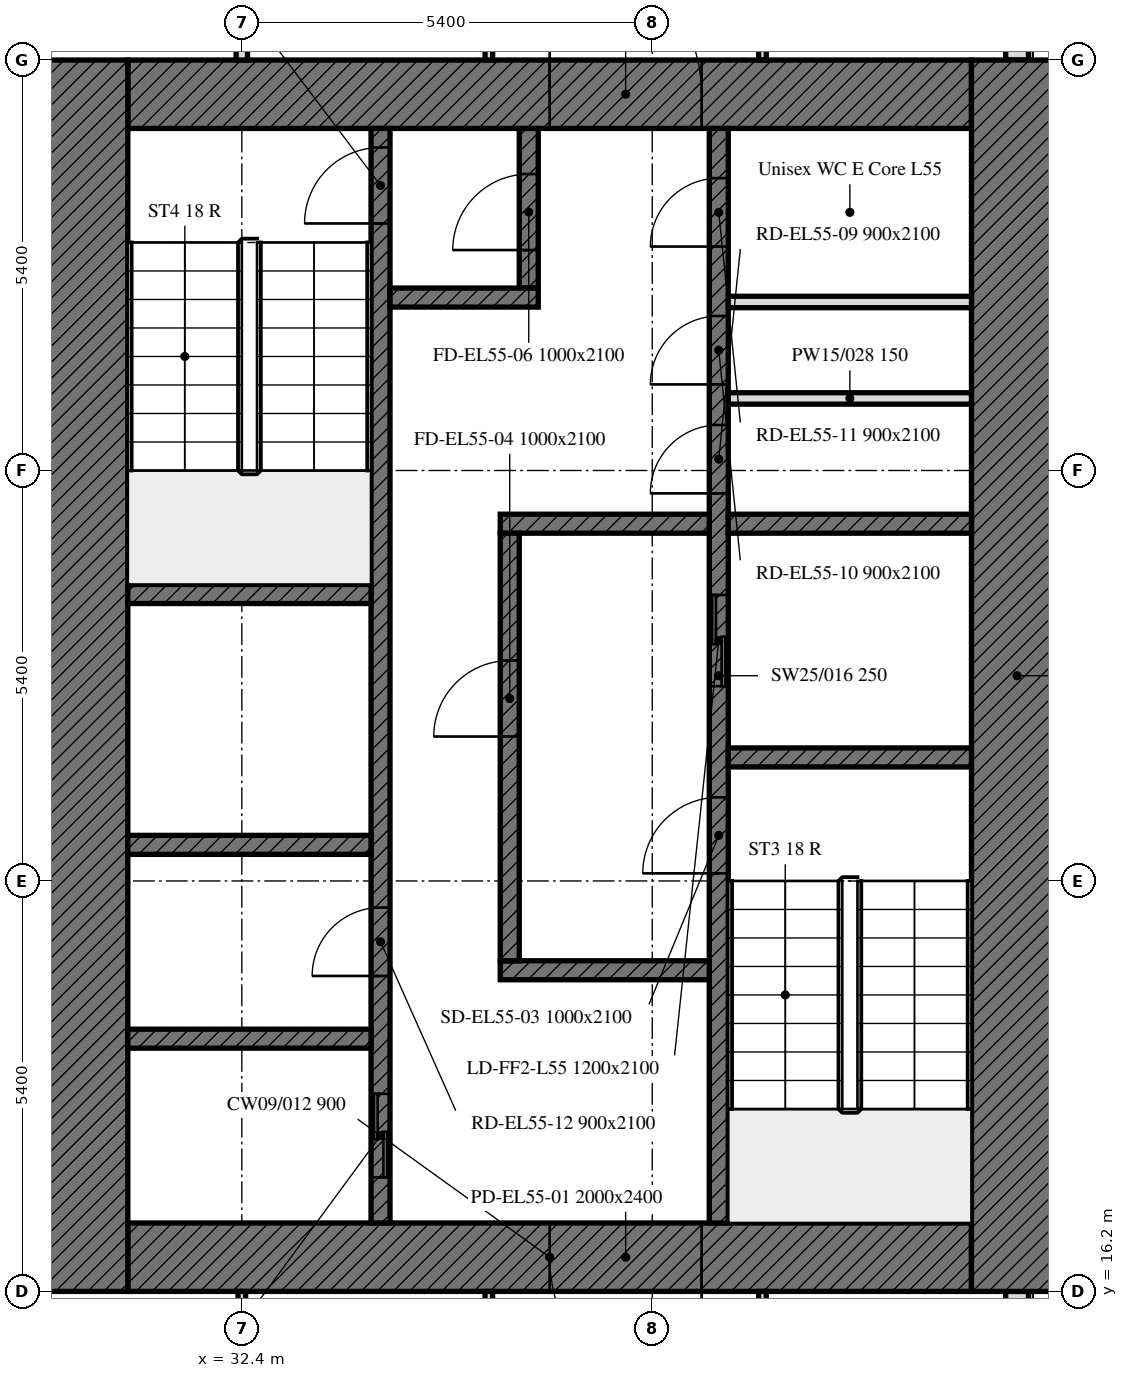
"""IFC4 building model, lengths in metres.
Left out: names, types, materials, properties, quantities, classifications, styles, units other than length and angle.
Written with IfcOpenShell. Run it as: python <this file> out.ifc"""

import sys

from ifc_helpers import new_model, si_unit, direction, frame, frame_2d, origin, place, context, subcontext, project, spatial, rectangle, extrude, element, fill, save


model = new_model("IFC4")
c1 = context("Model", 3, precision=1e-05, world=origin(), true_north=direction((0.0, 1.0)))
c2 = subcontext(c1, "Body", "Model", "MODEL_VIEW")
j1 = project(units=[si_unit("LENGTHUNIT", "METRE"), si_unit("PLANEANGLEUNIT", "RADIAN")], contexts=[c1])
p1 = place(None, origin())
s1 = spatial("IfcSite", under=j1, at=p1, CompositionType="ELEMENT")
p2 = place(p1, origin())
s2 = spatial("IfcBuilding", under=s1, at=p2, CompositionType="ELEMENT")
p3 = place(p2, frame((0.0, 0.0, 220.3)))
s3 = spatial("IfcBuildingStorey", under=s2, at=p3, CompositionType="ELEMENT", Elevation=220.3)
p4 = place(p3, frame((42.6, 10.986, 0.0), z_axis=(0.0, 0.0, 1.0), x_axis=(0.0, 1.0, 0.0)))
e1 = element("IfcWall", 1, at=p4, inside=s3, PredefinedType="SOLIDWALL", context=c2, shape_type="SweptSolid", body=[
    extrude(rectangle(XDim=5.214, YDim=0.3, at=frame_2d((2.607, 0.0))), origin(), (0.0, 0.0, 1.0), 3.0),
])
p5 = place(p4, frame((1.239, 0.0, 0.9)))
e2 = element("IfcOpeningElement", 2, at=p5, cuts=e1, PredefinedType="OPENING", context=c2, shape_type="SweptSolid", body=[
    extrude(rectangle(XDim=0.65, YDim=1.7, at=frame_2d((0.325, 0.85))), frame((0.0, 0.16, 0.0), z_axis=(0.0, -1.0, 0.0), x_axis=(1.0, 0.0, 0.0)), (0.0, 0.0, 1.0), 0.32),
])
p6 = place(p4, frame((2.764, 0.0, 0.9)))
e3 = element("IfcOpeningElement", 3, at=p6, cuts=e1, PredefinedType="OPENING", context=c2, shape_type="SweptSolid", body=[
    extrude(rectangle(XDim=1.1, YDim=1.7, at=frame_2d((0.55, 0.85))), frame((0.0, 0.16, 0.0), z_axis=(0.0, -1.0, 0.0), x_axis=(1.0, 0.0, 0.0)), (0.0, 0.0, 1.0), 0.32),
])
p7 = place(p3, frame((42.6, 32.4, 0.0), z_axis=(0.0, 0.0, 1.0), x_axis=(0.0, 1.0, 0.0)))
e4 = element("IfcWall", 4, at=p7, inside=s3, PredefinedType="SOLIDWALL", context=c2, shape_type="SweptSolid", body=[
    extrude(rectangle(XDim=10.614, YDim=0.3, at=frame_2d((5.307, 0.0))), origin(), (0.0, 0.0, 1.0), 3.0),
])
p8 = place(p7, frame((1.0, 0.0, 0.9)))
e5 = element("IfcOpeningElement", 5, at=p8, cuts=e4, PredefinedType="OPENING", context=c2, shape_type="SweptSolid", body=[
    extrude(rectangle(XDim=3.4, YDim=1.7, at=frame_2d((1.7, 0.85))), frame((0.0, 0.16, 0.0), z_axis=(0.0, -1.0, 0.0), x_axis=(1.0, 0.0, 0.0)), (0.0, 0.0, 1.0), 0.32),
])
p9 = place(p7, frame((7.375, 0.0, 0.9)))
e6 = element("IfcOpeningElement", 6, at=p9, cuts=e4, PredefinedType="OPENING", context=c2, shape_type="SweptSolid", body=[
    extrude(rectangle(XDim=0.65, YDim=1.7, at=frame_2d((0.325, 0.85))), frame((0.0, 0.16, 0.0), z_axis=(0.0, -1.0, 0.0), x_axis=(1.0, 0.0, 0.0)), (0.0, 0.0, 1.0), 0.32),
])
p10 = place(p7, frame((8.175, 0.0, 0.9)))
e7 = element("IfcOpeningElement", 7, at=p10, cuts=e4, PredefinedType="OPENING", context=c2, shape_type="SweptSolid", body=[
    extrude(rectangle(XDim=0.65, YDim=1.7, at=frame_2d((0.325, 0.85))), frame((0.0, 0.16, 0.0), z_axis=(0.0, -1.0, 0.0), x_axis=(1.0, 0.0, 0.0)), (0.0, 0.0, 1.0), 0.32),
])
p11 = place(p3, frame((42.0, 16.65, 0.0), z_axis=(0.0, 0.0, 1.0), x_axis=(-1.0, 0.0, 0.0)))
e8 = element("IfcWall", 8, at=p11, inside=s3, PredefinedType="SOLIDWALL", context=c2, shape_type="SweptSolid", body=[
    extrude(rectangle(XDim=11.1, YDim=0.9, at=frame_2d((5.55, 0.0))), origin(), (0.0, 0.0, 1.0), 3.0),
])
p12 = place(p11, frame((3.55, 0.0, 0.0)))
e9 = element("IfcOpeningElement", 9, at=p12, cuts=e8, PredefinedType="OPENING", context=c2, shape_type="SweptSolid", body=[
    extrude(rectangle(XDim=2.0, YDim=2.4, at=frame_2d((1.0, 1.2))), frame((0.0, 0.45, 0.0), z_axis=(0.0, -1.0, 0.0), x_axis=(1.0, 0.0, 0.0)), (0.0, 0.0, 1.0), 0.9),
])
p13 = place(p3, frame((30.9, 31.95, 0.0), z_axis=(0.0, 0.0, 1.0), x_axis=(1.0, 0.0, 0.0)))
e10 = element("IfcWall", 10, at=p13, inside=s3, PredefinedType="SOLIDWALL", context=c2, shape_type="SweptSolid", body=[
    extrude(rectangle(XDim=11.1, YDim=0.9, at=frame_2d((5.55, 0.0))), origin(), (0.0, 0.0, 1.0), 3.0),
])
p14 = place(p13, frame((5.55, 0.0, 0.0)))
e11 = element("IfcOpeningElement", 11, at=p14, cuts=e10, PredefinedType="OPENING", context=c2, shape_type="SweptSolid", body=[
    extrude(rectangle(XDim=2.0, YDim=2.4, at=frame_2d((1.0, 1.2))), frame((0.0, 0.45, 0.0), z_axis=(0.0, -1.0, 0.0), x_axis=(1.0, 0.0, 0.0)), (0.0, 0.0, 1.0), 0.9),
])
for number, where, z_axis, x_axis in (
    (12, (42.6, 32.4, 0.0), (0.0, 0.0, 1.0), (0.0, -1.0, 0.0)),
    (13, (30.3, 16.2, 0.0), (0.0, 0.0, 1.0), (0.0, 1.0, 0.0)),
):
    element("IfcWall", number, at=place(p3, frame(where, z_axis=z_axis, x_axis=x_axis)), inside=s3, PredefinedType="SOLIDWALL", context=c2, shape_type="SweptSolid", body=[
        extrude(rectangle(XDim=16.2, YDim=1.2, at=frame_2d((8.1, 0.0))), origin(), (0.0, 0.0, 1.0), 3.0),
    ])
p15 = place(p3, frame((38.675, 17.1, 0.0), z_axis=(0.0, 0.0, 1.0), x_axis=(0.0, 1.0, 0.0)))
e14 = element("IfcWall", 14, at=p15, inside=s3, PredefinedType="SOLIDWALL", context=c2, shape_type="SweptSolid", body=[
    extrude(rectangle(XDim=14.4, YDim=0.25, at=frame_2d((7.2, 0.0))), origin(), (0.0, 0.0, 1.0), 3.0),
])
p16 = place(p15, frame((4.6, 0.0, 0.0)))
e15 = element("IfcOpeningElement", 15, at=p16, cuts=e14, PredefinedType="OPENING", context=c2, shape_type="SweptSolid", body=[
    extrude(rectangle(XDim=1.0, YDim=2.1, at=frame_2d((0.5, 1.05))), frame((0.0, 0.125, 0.0), z_axis=(0.0, -1.0, 0.0), x_axis=(1.0, 0.0, 0.0)), (0.0, 0.0, 1.0), 0.25),
])
p17 = place(p15, frame((7.062, 0.0, 0.0)))
e16 = element("IfcOpeningElement", 16, at=p17, cuts=e14, PredefinedType="OPENING", context=c2, shape_type="SweptSolid", body=[
    extrude(rectangle(XDim=1.2, YDim=2.1, at=frame_2d((0.6, 1.05))), frame((0.0, 0.125, 0.0), z_axis=(0.0, -1.0, 0.0), x_axis=(1.0, 0.0, 0.0)), (0.0, 0.0, 1.0), 0.25),
])
p18 = place(p15, frame((9.599, 0.0, 0.0)))
e17 = element("IfcOpeningElement", 17, at=p18, cuts=e14, PredefinedType="OPENING", context=c2, shape_type="SweptSolid", body=[
    extrude(rectangle(XDim=0.9, YDim=2.1, at=frame_2d((0.45, 1.05))), frame((0.0, 0.125, 0.0), z_axis=(0.0, -1.0, 0.0), x_axis=(1.0, 0.0, 0.0)), (0.0, 0.0, 1.0), 0.25),
])
p19 = place(p15, frame((11.032, 0.0, 0.0)))
e18 = element("IfcOpeningElement", 18, at=p19, cuts=e14, PredefinedType="OPENING", context=c2, shape_type="SweptSolid", body=[
    extrude(rectangle(XDim=0.9, YDim=2.1, at=frame_2d((0.45, 1.05))), frame((0.0, 0.125, 0.0), z_axis=(0.0, -1.0, 0.0), x_axis=(1.0, 0.0, 0.0)), (0.0, 0.0, 1.0), 0.25),
])
p20 = place(p15, frame((12.846, 0.0, 0.0)))
e19 = element("IfcOpeningElement", 19, at=p20, cuts=e14, PredefinedType="OPENING", context=c2, shape_type="SweptSolid", body=[
    extrude(rectangle(XDim=0.9, YDim=2.1, at=frame_2d((0.45, 1.05))), frame((0.0, 0.125, 0.0), z_axis=(0.0, -1.0, 0.0), x_axis=(1.0, 0.0, 0.0)), (0.0, 0.0, 1.0), 0.25),
])
p21 = place(p3, frame((34.225, 17.1, 0.0), z_axis=(0.0, 0.0, 1.0), x_axis=(0.0, 1.0, 0.0)))
e20 = element("IfcWall", 20, at=p21, inside=s3, PredefinedType="SOLIDWALL", context=c2, shape_type="SweptSolid", body=[
    extrude(rectangle(XDim=14.4, YDim=0.25, at=frame_2d((7.2, 0.0))), origin(), (0.0, 0.0, 1.0), 3.0),
])
p22 = place(p21, frame((13.15, 0.0, 0.0)))
e21 = element("IfcOpeningElement", 21, at=p22, cuts=e20, PredefinedType="OPENING", context=c2, shape_type="SweptSolid", body=[
    extrude(rectangle(XDim=1.0, YDim=2.1, at=frame_2d((0.5, 1.05))), frame((0.0, 0.125, 0.0), z_axis=(0.0, -1.0, 0.0), x_axis=(1.0, 0.0, 0.0)), (0.0, 0.0, 1.0), 0.25),
])
p23 = place(p21, frame((0.6, 0.0, 0.0)))
e22 = element("IfcOpeningElement", 22, at=p23, cuts=e20, PredefinedType="OPENING", context=c2, shape_type="SweptSolid", body=[
    extrude(rectangle(XDim=1.1, YDim=2.1, at=frame_2d((0.55, 1.05))), frame((0.0, 0.125, 0.0), z_axis=(0.0, -1.0, 0.0), x_axis=(1.0, 0.0, 0.0)), (0.0, 0.0, 1.0), 0.25),
])
p24 = place(p21, frame((3.25, 0.0, 0.0)))
e23 = element("IfcOpeningElement", 23, at=p24, cuts=e20, PredefinedType="OPENING", context=c2, shape_type="SweptSolid", body=[
    extrude(rectangle(XDim=0.9, YDim=2.1, at=frame_2d((0.45, 1.05))), frame((0.0, 0.125, 0.0), z_axis=(0.0, -1.0, 0.0), x_axis=(1.0, 0.0, 0.0)), (0.0, 0.0, 1.0), 0.25),
])
p25 = place(p3, frame((38.8, 23.225, 0.0), z_axis=(0.0, 0.0, 1.0), x_axis=(1.0, 0.0, 0.0)))
e24 = element("IfcWall", 24, at=p25, inside=s3, PredefinedType="SOLIDWALL", context=c2, shape_type="SweptSolid", body=[
    extrude(rectangle(XDim=3.2, YDim=0.25, at=frame_2d((1.6, 0.0))), origin(), (0.0, 0.0, 1.0), 3.0),
])
for number, where, z_axis, x_axis in (
    (25, (30.9, 25.375, 0.0), (0.0, 0.0, 1.0), (1.0, 0.0, 0.0)),
    (26, (30.9, 22.075, 0.0), (0.0, 0.0, 1.0), (1.0, 0.0, 0.0)),
):
    element("IfcWall", number, at=place(p3, frame(where, z_axis=z_axis, x_axis=x_axis)), inside=s3, PredefinedType="SOLIDWALL", context=c2, shape_type="SweptSolid", body=[
        extrude(rectangle(XDim=3.2, YDim=0.25, at=frame_2d((1.6, 0.0))), origin(), (0.0, 0.0, 1.0), 3.0),
    ])
p26 = place(p3, frame((38.8, 26.3, 0.0), z_axis=(0.0, 0.0, 1.0), x_axis=(1.0, 0.0, 0.0)))
e27 = element("IfcWall", 27, at=p26, inside=s3, PredefinedType="SOLIDWALL", context=c2, shape_type="SweptSolid", body=[
    extrude(rectangle(XDim=3.2, YDim=0.25, at=frame_2d((1.6, 0.0))), origin(), (0.0, 0.0, 1.0), 3.0),
])
for number, where, z_axis, x_axis in (
    (28, (35.8, 26.3, 0.0), (0.0, 0.0, 1.0), (1.0, 0.0, 0.0)),
    (29, (35.8, 20.425, 0.0), (0.0, 0.0, 1.0), (1.0, 0.0, 0.0)),
):
    element("IfcWall", number, at=place(p3, frame(where, z_axis=z_axis, x_axis=x_axis)), inside=s3, PredefinedType="SOLIDWALL", context=c2, shape_type="SweptSolid", body=[
        extrude(rectangle(XDim=2.75, YDim=0.25, at=frame_2d((1.375, 0.0))), origin(), (0.0, 0.0, 1.0), 3.0),
    ])
p27 = place(p3, frame((36.175, 29.4, 0.0), z_axis=(0.0, 0.0, 1.0), x_axis=(0.0, 1.0, 0.0)))
e30 = element("IfcWall", 30, at=p27, inside=s3, PredefinedType="SOLIDWALL", context=c2, shape_type="SweptSolid", body=[
    extrude(rectangle(XDim=2.1, YDim=0.25, at=frame_2d((1.05, 0.0))), origin(), (0.0, 0.0, 1.0), 3.0),
])
p28 = place(p27, frame((0.5, 0.0, 0.0)))
e31 = element("IfcOpeningElement", 31, at=p28, cuts=e30, PredefinedType="OPENING", context=c2, shape_type="SweptSolid", body=[
    extrude(rectangle(XDim=1.0, YDim=2.1, at=frame_2d((0.5, 1.05))), frame((0.0, 0.125, 0.0), z_axis=(0.0, -1.0, 0.0), x_axis=(1.0, 0.0, 0.0)), (0.0, 0.0, 1.0), 0.25),
])
p29 = place(p3, frame((34.35, 29.275, 0.0), z_axis=(0.0, 0.0, 1.0), x_axis=(1.0, 0.0, 0.0)))
e32 = element("IfcWall", 32, at=p29, inside=s3, PredefinedType="SOLIDWALL", context=c2, shape_type="SweptSolid", body=[
    extrude(rectangle(XDim=1.95, YDim=0.25, at=frame_2d((0.975, 0.0))), origin(), (0.0, 0.0, 1.0), 3.0),
])
p30 = place(p3, frame((35.925, 20.55, 0.0), z_axis=(0.0, 0.0, 1.0), x_axis=(0.0, 1.0, 0.0)))
e33 = element("IfcWall", 33, at=p30, inside=s3, PredefinedType="SOLIDWALL", context=c2, shape_type="SweptSolid", body=[
    extrude(rectangle(XDim=5.625, YDim=0.25, at=frame_2d((2.812, 0.0))), origin(), (0.0, 0.0, 1.0), 3.0),
])
p31 = place(p30, frame((2.95, 0.0, 0.0)))
e34 = element("IfcOpeningElement", 34, at=p31, cuts=e33, PredefinedType="OPENING", context=c2, shape_type="SweptSolid", body=[
    extrude(rectangle(XDim=1.0, YDim=2.1, at=frame_2d((0.5, 1.05))), frame((0.0, 0.125, 0.0), z_axis=(0.0, -1.0, 0.0), x_axis=(1.0, 0.0, 0.0)), (0.0, 0.0, 1.0), 0.25),
])
p32 = place(p3, frame((30.9, 19.525, 0.0), z_axis=(0.0, 0.0, 1.0), x_axis=(1.0, 0.0, 0.0)))
e35 = element("IfcWall", 35, at=p32, inside=s3, PredefinedType="SOLIDWALL", context=c2, shape_type="SweptSolid", body=[
    extrude(rectangle(XDim=3.2, YDim=0.25, at=frame_2d((1.6, 0.0))), origin(), (0.0, 0.0, 1.0), 3.0),
])
for number, where, z_axis, x_axis in (
    (36, (38.8, 27.948, 0.0), (0.0, 0.0, 1.0), (1.0, 0.0, 0.0)),
    (37, (38.8, 29.217, 0.0), (0.0, 0.0, 1.0), (1.0, 0.0, 0.0)),
):
    element("IfcWall", number, at=place(p3, frame(where, z_axis=z_axis, x_axis=x_axis)), inside=s3, PredefinedType="PARTITIONING", context=c2, shape_type="SweptSolid", body=[
        extrude(rectangle(XDim=3.2, YDim=0.15, at=frame_2d((1.6, 0.0))), origin(), (0.0, 0.0, 1.0), 3.0),
    ])
p33 = place(p3, frame((32.4, 32.4, 0.0), z_axis=(0.0, 0.0, 1.0), x_axis=(0.0, 1.0, 0.0)))
e38 = element("IfcWall", 38, at=p33, inside=s3, PredefinedType="PARTITIONING", context=c2, shape_type="SweptSolid", body=[
    extrude(rectangle(XDim=5.005, YDim=0.15, at=frame_2d((2.502, 0.0))), origin(), (0.0, 0.0, 1.0), 2.4),
])
for number, where, z_axis, x_axis in (
    (39, (39.25, 32.4, 0.0), (0.0, 0.0, 1.0), (0.0, 1.0, 0.0)),
    (40, (35.65, 39.525, 0.0), (0.0, 0.0, 1.0), (0.0, -1.0, 0.0)),
):
    element("IfcWall", number, at=place(p3, frame(where, z_axis=z_axis, x_axis=x_axis)), inside=s3, PredefinedType="PARTITIONING", context=c2, shape_type="SweptSolid", body=[
        extrude(rectangle(XDim=7.125, YDim=0.1, at=frame_2d((3.562, 0.0))), origin(), (0.0, 0.0, 1.0), 3.0),
    ])
for number, where, z_axis, x_axis in (
    (41, (32.4, 13.125, 0.0), (0.0, 0.0, 1.0), (0.0, 1.0, 0.0)),
    (42, (39.25, 13.125, 0.0), (0.0, 0.0, 1.0), (0.0, 1.0, 0.0)),
    (43, (35.65, 16.2, 0.0), (0.0, 0.0, 1.0), (0.0, -1.0, 0.0)),
):
    element("IfcWall", number, at=place(p3, frame(where, z_axis=z_axis, x_axis=x_axis)), inside=s3, PredefinedType="PARTITIONING", context=c2, shape_type="SweptSolid", body=[
        extrude(rectangle(XDim=3.075, YDim=0.1, at=frame_2d((1.538, 0.0))), origin(), (0.0, 0.0, 1.0), 3.0),
    ])
p34 = place(p12, origin())
e44 = element("IfcDoor", 44, at=p34, inside=s3, OperationType="DOUBLE_DOOR_SINGLE_SWING", PredefinedType="DOOR", context=c2, shape_type="SweptSolid", body=[
    extrude(rectangle(XDim=2.0, YDim=2.4, at=frame_2d((1.0, 1.2))), frame((0.0, 0.025, 0.0), z_axis=(0.0, -1.0, 0.0), x_axis=(1.0, 0.0, 0.0)), (0.0, 0.0, 1.0), 0.05),
])
fill(e9, e44)
p35 = place(p14, origin())
e45 = element("IfcDoor", 45, at=p35, inside=s3, OperationType="DOUBLE_DOOR_SINGLE_SWING", PredefinedType="DOOR", context=c2, shape_type="SweptSolid", body=[
    extrude(rectangle(XDim=2.0, YDim=2.4, at=frame_2d((1.0, 1.2))), frame((0.0, 0.025, 0.0), z_axis=(0.0, -1.0, 0.0), x_axis=(1.0, 0.0, 0.0)), (0.0, 0.0, 1.0), 0.05),
])
fill(e11, e45)
p36 = place(p16, origin())
e46 = element("IfcDoor", 46, at=p36, inside=s3, OperationType="SINGLE_SWING_LEFT", PredefinedType="DOOR", context=c2, shape_type="SweptSolid", body=[
    extrude(rectangle(XDim=1.0, YDim=2.1, at=frame_2d((0.5, 1.05))), frame((0.0, 0.025, 0.0), z_axis=(0.0, -1.0, 0.0), x_axis=(1.0, 0.0, 0.0)), (0.0, 0.0, 1.0), 0.05),
])
fill(e15, e46)
p37 = place(p31, origin())
e47 = element("IfcDoor", 47, at=p37, inside=s3, OperationType="SINGLE_SWING_LEFT", PredefinedType="DOOR", context=c2, shape_type="SweptSolid", body=[
    extrude(rectangle(XDim=1.0, YDim=2.1, at=frame_2d((0.5, 1.05))), frame((0.0, 0.025, 0.0), z_axis=(0.0, -1.0, 0.0), x_axis=(1.0, 0.0, 0.0)), (0.0, 0.0, 1.0), 0.05),
])
fill(e34, e47)
p38 = place(p22, origin())
e48 = element("IfcDoor", 48, at=p38, inside=s3, OperationType="SINGLE_SWING_LEFT", PredefinedType="DOOR", context=c2, shape_type="SweptSolid", body=[
    extrude(rectangle(XDim=1.0, YDim=2.1, at=frame_2d((0.5, 1.05))), frame((0.0, 0.025, 0.0), z_axis=(0.0, -1.0, 0.0), x_axis=(1.0, 0.0, 0.0)), (0.0, 0.0, 1.0), 0.05),
])
fill(e21, e48)
p39 = place(p28, origin())
e49 = element("IfcDoor", 49, at=p39, inside=s3, OperationType="SINGLE_SWING_LEFT", PredefinedType="DOOR", context=c2, shape_type="SweptSolid", body=[
    extrude(rectangle(XDim=1.0, YDim=2.1, at=frame_2d((0.5, 1.05))), frame((0.0, 0.025, 0.0), z_axis=(0.0, -1.0, 0.0), x_axis=(1.0, 0.0, 0.0)), (0.0, 0.0, 1.0), 0.05),
])
fill(e31, e49)
p40 = place(p17, origin())
e50 = element("IfcDoor", 50, at=p40, inside=s3, OperationType="DOUBLE_DOOR_SLIDING", PredefinedType="DOOR", context=c2, shape_type="SweptSolid", body=[
    extrude(rectangle(XDim=1.2, YDim=2.1, at=frame_2d((0.6, 1.05))), frame((0.0, 0.025, 0.0), z_axis=(0.0, -1.0, 0.0), x_axis=(1.0, 0.0, 0.0)), (0.0, 0.0, 1.0), 0.05),
])
fill(e16, e50)
p41 = place(p23, origin())
e51 = element("IfcDoor", 51, at=p41, inside=s3, OperationType="DOUBLE_DOOR_SLIDING", PredefinedType="DOOR", context=c2, shape_type="SweptSolid", body=[
    extrude(rectangle(XDim=1.1, YDim=2.1, at=frame_2d((0.55, 1.05))), frame((0.0, 0.025, 0.0), z_axis=(0.0, -1.0, 0.0), x_axis=(1.0, 0.0, 0.0)), (0.0, 0.0, 1.0), 0.05),
])
fill(e22, e51)
p42 = place(p18, origin())
e52 = element("IfcDoor", 52, at=p42, inside=s3, OperationType="SINGLE_SWING_LEFT", PredefinedType="DOOR", context=c2, shape_type="SweptSolid", body=[
    extrude(rectangle(XDim=0.9, YDim=2.1, at=frame_2d((0.45, 1.05))), frame((0.0, 0.025, 0.0), z_axis=(0.0, -1.0, 0.0), x_axis=(1.0, 0.0, 0.0)), (0.0, 0.0, 1.0), 0.05),
])
fill(e17, e52)
p43 = place(p19, origin())
e53 = element("IfcDoor", 53, at=p43, inside=s3, OperationType="SINGLE_SWING_LEFT", PredefinedType="DOOR", context=c2, shape_type="SweptSolid", body=[
    extrude(rectangle(XDim=0.9, YDim=2.1, at=frame_2d((0.45, 1.05))), frame((0.0, 0.025, 0.0), z_axis=(0.0, -1.0, 0.0), x_axis=(1.0, 0.0, 0.0)), (0.0, 0.0, 1.0), 0.05),
])
fill(e18, e53)
p44 = place(p20, origin())
e54 = element("IfcDoor", 54, at=p44, inside=s3, OperationType="SINGLE_SWING_LEFT", PredefinedType="DOOR", context=c2, shape_type="SweptSolid", body=[
    extrude(rectangle(XDim=0.9, YDim=2.1, at=frame_2d((0.45, 1.05))), frame((0.0, 0.025, 0.0), z_axis=(0.0, -1.0, 0.0), x_axis=(1.0, 0.0, 0.0)), (0.0, 0.0, 1.0), 0.05),
])
fill(e19, e54)
p45 = place(p24, origin())
e55 = element("IfcDoor", 55, at=p45, inside=s3, OperationType="SINGLE_SWING_LEFT", PredefinedType="DOOR", context=c2, shape_type="SweptSolid", body=[
    extrude(rectangle(XDim=0.9, YDim=2.1, at=frame_2d((0.45, 1.05))), frame((0.0, 0.025, 0.0), z_axis=(0.0, -1.0, 0.0), x_axis=(1.0, 0.0, 0.0)), (0.0, 0.0, 1.0), 0.05),
])
fill(e23, e55)
save(model, sys.argv[1])
